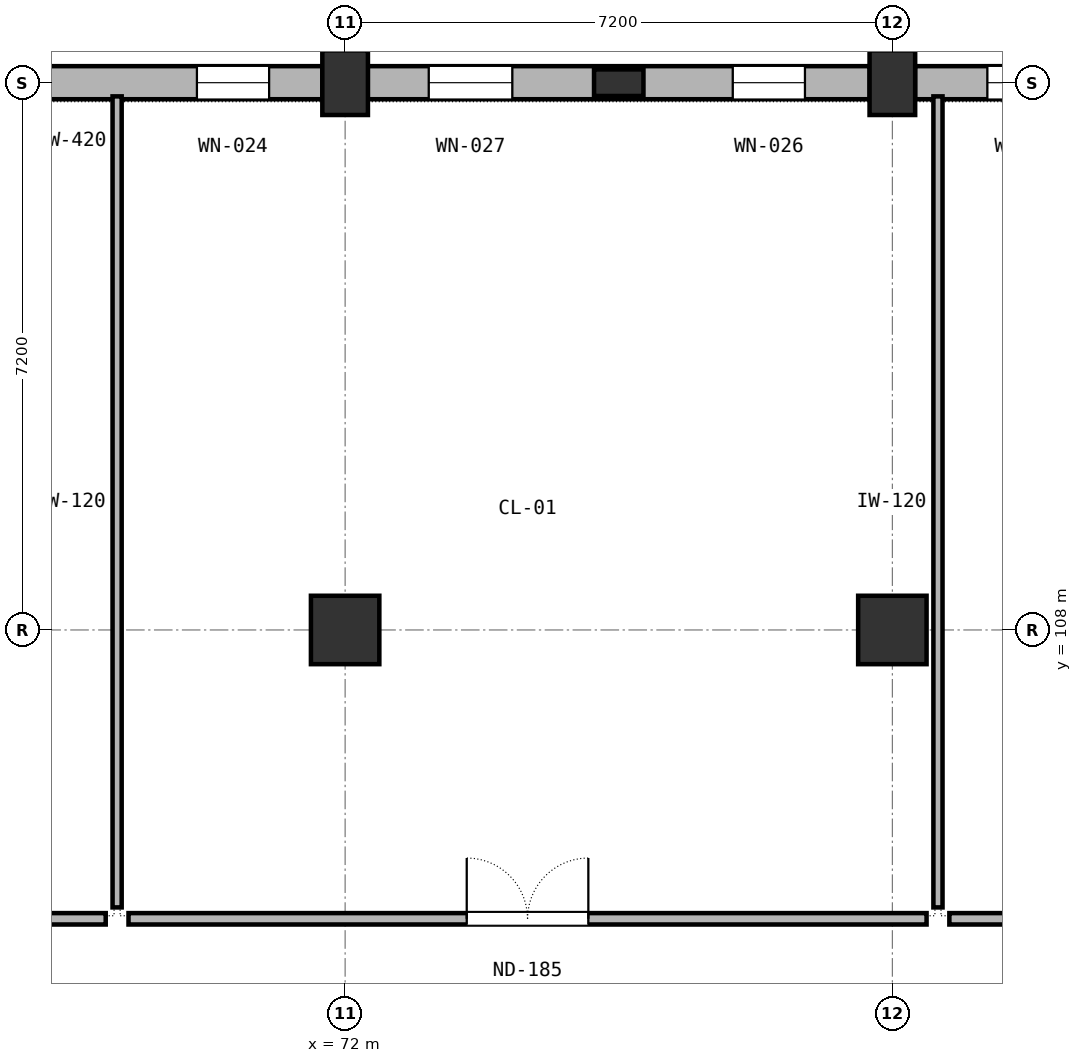
"""IFC4 building model, lengths in metres.
Left out: names, types, materials, properties, quantities, classifications, styles, units other than length and angle.
Written with IfcOpenShell. Run it as: python <this file> out.ifc"""

import sys

from ifc_helpers import new_model, si_unit, direction, frame, frame_2d, origin, origin_2d, place, context, subcontext, project, spatial, rectangle, extrude, element, fill, save


model = new_model("IFC4")
c1 = context("Model", 3, precision=1e-05, world=origin(), true_north=direction((0.0, 1.0)))
c2 = subcontext(c1, "Body", "Model", "MODEL_VIEW")
j1 = project(units=[si_unit("LENGTHUNIT", "METRE"), si_unit("PLANEANGLEUNIT", "RADIAN")], contexts=[c1])
p1 = place(None, origin())
s1 = spatial("IfcSite", under=j1, at=p1, CompositionType="ELEMENT")
p2 = place(p1, origin())
s2 = spatial("IfcBuilding", under=s1, at=p2, CompositionType="ELEMENT")
p3 = place(p2, frame((0.0, 0.0, 5.4)))
s3 = spatial("IfcBuildingStorey", under=s2, at=p3, CompositionType="ELEMENT", Elevation=5.4)
p4 = place(p3, frame((72.0, 108.0, 0.0), z_axis=(0.0, 0.0, 1.0), x_axis=(1.0, 0.0, 0.0)))
e1 = element("IfcColumn", 1, at=p4, inside=s3, PredefinedType="COLUMN", context=c2, shape_type="SweptSolid", body=[
    extrude(rectangle(XDim=0.9, YDim=0.9, at=origin_2d()), origin(), (0.0, 0.0, 1.0), 4.8),
])
p5 = place(p3, frame((72.0, 115.2, 0.0), z_axis=(0.0, 0.0, 1.0), x_axis=(1.0, 0.0, 0.0)))
e2 = element("IfcColumn", 2, at=p5, inside=s3, PredefinedType="COLUMN", context=c2, shape_type="SweptSolid", body=[
    extrude(rectangle(XDim=0.6, YDim=0.85, at=origin_2d()), origin(), (0.0, 0.0, 1.0), 4.8),
])
p6 = place(p3, frame((79.2, 108.0, 0.0), z_axis=(0.0, 0.0, 1.0), x_axis=(1.0, 0.0, 0.0)))
e3 = element("IfcColumn", 3, at=p6, inside=s3, PredefinedType="COLUMN", context=c2, shape_type="SweptSolid", body=[
    extrude(rectangle(XDim=0.9, YDim=0.9, at=origin_2d()), origin(), (0.0, 0.0, 1.0), 4.8),
])
p7 = place(p3, frame((79.2, 115.2, 0.0), z_axis=(0.0, 0.0, 1.0), x_axis=(1.0, 0.0, 0.0)))
e4 = element("IfcColumn", 4, at=p7, inside=s3, PredefinedType="COLUMN", context=c2, shape_type="SweptSolid", body=[
    extrude(rectangle(XDim=0.6, YDim=0.85, at=origin_2d()), origin(), (0.0, 0.0, 1.0), 4.8),
])
p8 = place(p3, frame((75.6, 115.2, 0.0), z_axis=(0.0, 0.0, 1.0), x_axis=(1.0, 0.0, 0.0)))
e5 = element("IfcColumn", 5, at=p8, inside=s3, PredefinedType="PILASTER", context=c2, shape_type="SweptSolid", body=[
    extrude(rectangle(XDim=0.65, YDim=0.35, at=origin_2d()), origin(), (0.0, 0.0, 1.0), 4.8),
])
p9 = place(p3, frame((71.702, 115.2, 0.0), z_axis=(0.0, 0.0, 1.0), x_axis=(-1.0, 0.0, 0.0)))
e6 = element("IfcWall", 6, at=p9, inside=s3, PredefinedType="SOLIDWALL", context=c2, shape_type="SweptSolid", body=[
    extrude(rectangle(XDim=6.604, YDim=0.435, at=frame_2d((3.302, 0.0))), origin(), (0.0, 0.0, 1.0), 3.5),
])
p10 = place(p9, frame((0.702, 0.0, 0.7)))
e7 = element("IfcOpeningElement", 7, at=p10, cuts=e6, PredefinedType="OPENING", context=c2, shape_type="SweptSolid", body=[
    extrude(rectangle(XDim=0.95, YDim=2.6, at=frame_2d((0.475, 1.3))), frame((0.0, 0.228, 0.0), z_axis=(0.0, -1.0, 0.0), x_axis=(1.0, 0.0, 0.0)), (0.0, 0.0, 1.0), 0.455),
])
p11 = place(p9, frame((4.552, 0.0, 0.7)))
e8 = element("IfcOpeningElement", 8, at=p11, cuts=e6, PredefinedType="OPENING", context=c2, shape_type="SweptSolid", body=[
    extrude(rectangle(XDim=1.1, YDim=2.6, at=frame_2d((0.55, 1.3))), frame((0.0, 0.228, 0.0), z_axis=(0.0, -1.0, 0.0), x_axis=(1.0, 0.0, 0.0)), (0.0, 0.0, 1.0), 0.455),
])
p12 = place(p3, frame((78.902, 115.2, 0.0), z_axis=(0.0, 0.0, 1.0), x_axis=(-1.0, 0.0, 0.0)))
e9 = element("IfcWall", 9, at=p12, inside=s3, PredefinedType="SOLIDWALL", context=c2, shape_type="SweptSolid", body=[
    extrude(rectangle(XDim=6.604, YDim=0.435, at=frame_2d((3.302, 0.0))), origin(), (0.0, 0.0, 1.0), 3.5),
])
p13 = place(p12, frame((0.852, 0.0, 0.7)))
e10 = element("IfcOpeningElement", 10, at=p13, cuts=e9, PredefinedType="OPENING", context=c2, shape_type="SweptSolid", body=[
    extrude(rectangle(XDim=0.95, YDim=2.6, at=frame_2d((0.475, 1.3))), frame((0.0, 0.228, 0.0), z_axis=(0.0, -1.0, 0.0), x_axis=(1.0, 0.0, 0.0)), (0.0, 0.0, 1.0), 0.455),
])
p14 = place(p12, frame((4.702, 0.0, 0.7)))
e11 = element("IfcOpeningElement", 11, at=p14, cuts=e9, PredefinedType="OPENING", context=c2, shape_type="SweptSolid", body=[
    extrude(rectangle(XDim=1.1, YDim=2.6, at=frame_2d((0.55, 1.3))), frame((0.0, 0.228, 0.0), z_axis=(0.0, -1.0, 0.0), x_axis=(1.0, 0.0, 0.0)), (0.0, 0.0, 1.0), 0.455),
])
p15 = place(p3, frame((86.102, 115.2, 0.0), z_axis=(0.0, 0.0, 1.0), x_axis=(-1.0, 0.0, 0.0)))
e12 = element("IfcWall", 12, at=p15, inside=s3, PredefinedType="SOLIDWALL", context=c2, shape_type="SweptSolid", body=[
    extrude(rectangle(XDim=6.604, YDim=0.435, at=frame_2d((3.302, 0.0))), origin(), (0.0, 0.0, 1.0), 3.5),
])
p16 = place(p15, frame((0.702, 0.0, 0.7)))
e13 = element("IfcOpeningElement", 13, at=p16, cuts=e12, PredefinedType="OPENING", context=c2, shape_type="SweptSolid", body=[
    extrude(rectangle(XDim=0.95, YDim=2.6, at=frame_2d((0.475, 1.3))), frame((0.0, 0.228, 0.0), z_axis=(0.0, -1.0, 0.0), x_axis=(1.0, 0.0, 0.0)), (0.0, 0.0, 1.0), 0.455),
])
p17 = place(p15, frame((4.552, 0.0, 0.7)))
e14 = element("IfcOpeningElement", 14, at=p17, cuts=e12, PredefinedType="OPENING", context=c2, shape_type="SweptSolid", body=[
    extrude(rectangle(XDim=1.1, YDim=2.6, at=frame_2d((0.55, 1.3))), frame((0.0, 0.228, 0.0), z_axis=(0.0, -1.0, 0.0), x_axis=(1.0, 0.0, 0.0)), (0.0, 0.0, 1.0), 0.455),
])
p18 = place(p3, frame((52.95, 104.2, 0.0), z_axis=(0.0, 0.0, 1.0), x_axis=(1.0, 0.0, 0.0)))
e15 = element("IfcWall", 15, at=p18, inside=s3, PredefinedType="PARTITIONING", context=c2, shape_type="SweptSolid", body=[
    extrude(rectangle(XDim=15.9, YDim=0.15, at=frame_2d((7.95, 0.0))), origin(), (0.0, 0.0, 1.0), 3.52),
])
p19 = place(p18, frame((7.25, 0.0, 0.0)))
e16 = element("IfcOpeningElement", 16, at=p19, cuts=e15, PredefinedType="OPENING", context=c2, shape_type="SweptSolid", body=[
    extrude(rectangle(XDim=1.4, YDim=2.2, at=frame_2d((0.7, 1.1))), frame((0.0, 0.085, 0.0), z_axis=(0.0, -1.0, 0.0), x_axis=(1.0, 0.0, 0.0)), (0.0, 0.0, 1.0), 0.17),
])
p20 = place(p3, frame((69.15, 104.2, 0.0), z_axis=(0.0, 0.0, 1.0), x_axis=(1.0, 0.0, 0.0)))
e17 = element("IfcWall", 17, at=p20, inside=s3, PredefinedType="PARTITIONING", context=c2, shape_type="SweptSolid", body=[
    extrude(rectangle(XDim=10.5, YDim=0.15, at=frame_2d((5.25, 0.0))), origin(), (0.0, 0.0, 1.0), 3.52),
])
p21 = place(p20, frame((4.45, 0.0, 0.0)))
e18 = element("IfcOpeningElement", 18, at=p21, cuts=e17, PredefinedType="OPENING", context=c2, shape_type="SweptSolid", body=[
    extrude(rectangle(XDim=1.6, YDim=2.2, at=frame_2d((0.8, 1.1))), frame((0.0, 0.085, 0.0), z_axis=(0.0, -1.0, 0.0), x_axis=(1.0, 0.0, 0.0)), (0.0, 0.0, 1.0), 0.17),
])
p22 = place(p3, frame((69.0, 104.35, 0.0), z_axis=(0.0, 0.0, 1.0), x_axis=(0.0, 1.0, 0.0)))
e19 = element("IfcWall", 19, at=p22, inside=s3, PredefinedType="PARTITIONING", context=c2, shape_type="SweptSolid", body=[
    extrude(rectangle(XDim=10.67, YDim=0.12, at=frame_2d((5.335, 0.0))), origin(), (0.0, 0.0, 1.0), 3.52),
])
p23 = place(p3, frame((79.95, 104.2, 0.0), z_axis=(0.0, 0.0, 1.0), x_axis=(1.0, 0.0, 0.0)))
e20 = element("IfcWall", 20, at=p23, inside=s3, PredefinedType="PARTITIONING", context=c2, shape_type="SweptSolid", body=[
    extrude(rectangle(XDim=9.1, YDim=0.15, at=frame_2d((4.55, 0.0))), origin(), (0.0, 0.0, 1.0), 3.52),
])
p24 = place(p23, frame((4.05, 0.0, 0.0)))
e21 = element("IfcOpeningElement", 21, at=p24, cuts=e20, PredefinedType="OPENING", context=c2, shape_type="SweptSolid", body=[
    extrude(rectangle(XDim=1.0, YDim=2.15, at=frame_2d((0.5, 1.075))), frame((0.0, 0.085, 0.0), z_axis=(0.0, -1.0, 0.0), x_axis=(1.0, 0.0, 0.0)), (0.0, 0.0, 1.0), 0.17),
])
p25 = place(p3, frame((79.8, 104.35, 0.0), z_axis=(0.0, 0.0, 1.0), x_axis=(0.0, 1.0, 0.0)))
e22 = element("IfcWall", 22, at=p25, inside=s3, PredefinedType="PARTITIONING", context=c2, shape_type="SweptSolid", body=[
    extrude(rectangle(XDim=10.67, YDim=0.12, at=frame_2d((5.335, 0.0))), origin(), (0.0, 0.0, 1.0), 3.52),
])
p26 = place(p10, origin())
e23 = element("IfcWindow", 23, at=p26, inside=s3, PartitioningType="SINGLE_PANEL", PredefinedType="WINDOW", context=c2, shape_type="SweptSolid", body=[
    extrude(rectangle(XDim=0.95, YDim=2.6, at=frame_2d((0.475, 1.3))), frame((0.0, 0.03, 0.0), z_axis=(0.0, -1.0, 0.0), x_axis=(1.0, 0.0, 0.0)), (0.0, 0.0, 1.0), 0.06),
])
fill(e7, e23)
p27 = place(p13, origin())
e24 = element("IfcWindow", 24, at=p27, inside=s3, PartitioningType="SINGLE_PANEL", PredefinedType="WINDOW", context=c2, shape_type="SweptSolid", body=[
    extrude(rectangle(XDim=0.95, YDim=2.6, at=frame_2d((0.475, 1.3))), frame((0.0, 0.03, 0.0), z_axis=(0.0, -1.0, 0.0), x_axis=(1.0, 0.0, 0.0)), (0.0, 0.0, 1.0), 0.06),
])
fill(e10, e24)
p28 = place(p14, origin())
e25 = element("IfcWindow", 25, at=p28, inside=s3, PartitioningType="SINGLE_PANEL", PredefinedType="WINDOW", context=c2, shape_type="SweptSolid", body=[
    extrude(rectangle(XDim=1.1, YDim=2.6, at=frame_2d((0.55, 1.3))), frame((0.0, 0.03, 0.0), z_axis=(0.0, -1.0, 0.0), x_axis=(1.0, 0.0, 0.0)), (0.0, 0.0, 1.0), 0.06),
])
fill(e11, e25)
p29 = place(p17, origin())
e26 = element("IfcWindow", 26, at=p29, inside=s3, PartitioningType="SINGLE_PANEL", PredefinedType="WINDOW", context=c2, shape_type="SweptSolid", body=[
    extrude(rectangle(XDim=1.1, YDim=2.6, at=frame_2d((0.55, 1.3))), frame((0.0, 0.03, 0.0), z_axis=(0.0, -1.0, 0.0), x_axis=(1.0, 0.0, 0.0)), (0.0, 0.0, 1.0), 0.06),
])
fill(e14, e26)
p30 = place(p21, origin())
e27 = element("IfcDoor", 27, at=p30, inside=s3, OperationType="DOUBLE_DOOR_SINGLE_SWING", PredefinedType="DOOR", context=c2, shape_type="SweptSolid", body=[
    extrude(rectangle(XDim=1.6, YDim=2.2, at=frame_2d((0.8, 1.1))), frame((0.0, 0.025, 0.0), z_axis=(0.0, -1.0, 0.0), x_axis=(1.0, 0.0, 0.0)), (0.0, 0.0, 1.0), 0.05),
])
fill(e18, e27)
save(model, sys.argv[1])
